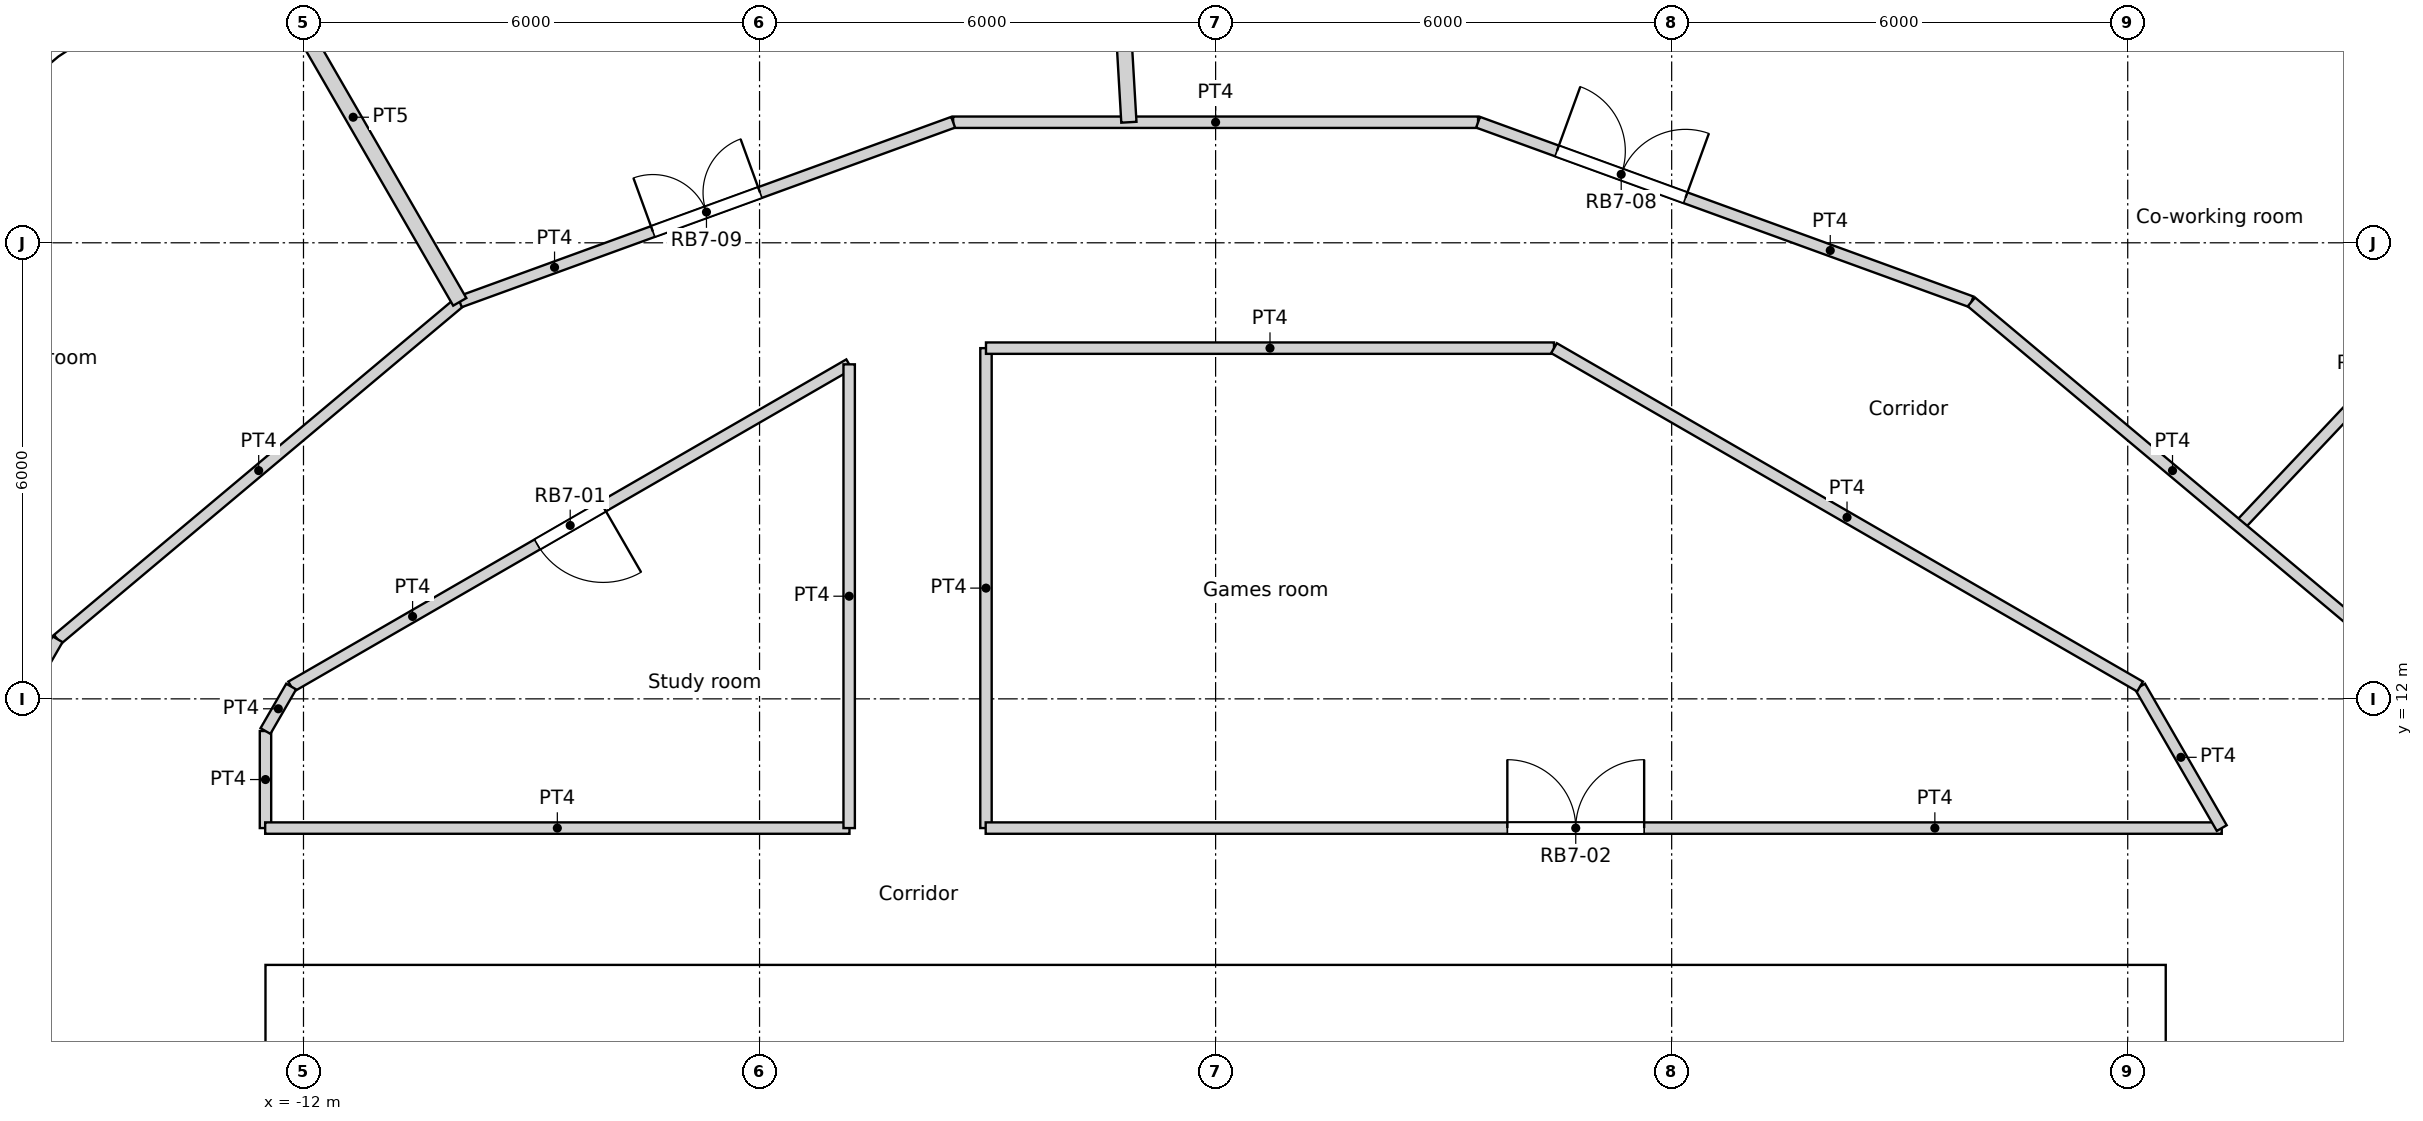
"""IFC4 building model, lengths in metres.
Left out: names, types, materials, properties, quantities, classifications, styles, units other than length and angle.
Written with IfcOpenShell. Run it as: python <this file> out.ifc"""

import sys

from ifc_helpers import new_model, si_unit, direction, frame, frame_2d, origin, origin_2d, place, context, subcontext, project, spatial, rectangle, circle, extrude, element, fill, save


model = new_model("IFC4")
c1 = context("Model", 3, precision=1e-05, world=origin(), true_north=direction((0.0, 1.0)))
c2 = subcontext(c1, "Body", "Model", "MODEL_VIEW")
j1 = project(units=[si_unit("LENGTHUNIT", "METRE"), si_unit("PLANEANGLEUNIT", "RADIAN")], contexts=[c1])
p1 = place(None, origin())
s1 = spatial("IfcSite", under=j1, at=p1, CompositionType="ELEMENT")
p2 = place(p1, origin())
s2 = spatial("IfcBuilding", under=s1, at=p2, CompositionType="ELEMENT")
p3 = place(p2, frame((0.0, 0.0, 190.8)))
s3 = spatial("IfcBuildingStorey", under=s2, at=p3, CompositionType="ELEMENT", Elevation=190.8)
p4 = place(p3, frame((14.659, 19.69, 0.0), z_axis=(0.0, 0.0, 1.0), x_axis=(1.0, 0.0, 0.0)))
e1 = element("IfcColumn", 1, at=p4, inside=s3, PredefinedType="COLUMN", context=c2, shape_type="SweptSolid", body=[
    extrude(circle(Radius=0.6, at=origin_2d()), origin(), (0.0, 0.0, 1.0), 3.6),
])
for number, where, z_axis, x_axis in (
    (2, (11.735, 14.716, 0.0), (0.0, 0.0, 1.0), (1.0, 0.0, 0.0)),
    (3, (6.876, 17.521, 0.0), (0.0, 0.0, 1.0), (1.0, 0.0, 0.0)),
    (4, (1.406, 18.77, 0.0), (0.0, 0.0, 1.0), (1.0, 0.0, 0.0)),
    (5, (-4.188, 18.35, 0.0), (0.0, 0.0, 1.0), (1.0, 0.0, 0.0)),
    (6, (-9.411, 16.301, 0.0), (0.0, 0.0, 1.0), (1.0, 0.0, 0.0)),
    (7, (-13.798, 12.802, 0.0), (0.0, 0.0, 1.0), (1.0, 0.0, 0.0)),
):
    element("IfcColumn", number, at=place(p3, frame(where, z_axis=z_axis, x_axis=x_axis)), inside=s3, PredefinedType="COLUMN", context=c2, shape_type="SweptSolid", body=[
        extrude(circle(Radius=0.65, at=origin_2d()), origin(), (0.0, 0.0, 1.0), 3.6),
    ])
p5 = place(p3, frame((15.639, 21.048, -0.3), z_axis=(0.0, 0.0, 1.0), x_axis=(-0.835514416706, 0.549468524554, 0.0)))
e8 = element("IfcWall", 8, at=p5, inside=s3, PredefinedType="ELEMENTEDWALL", context=c2, shape_type="SweptSolid", body=[
    extrude(rectangle(XDim=3.0, YDim=1.45, at=frame_2d((1.5, 0.0))), origin(), (0.0, 0.0, 1.0), 3.6),
])
p6 = place(p5, frame((1.5, 0.0, 1.85)))
e9 = element("IfcOpeningElement", 9, at=p6, cuts=e8, PredefinedType="OPENING", context=c2, shape_type="SweptSolid", body=[
    extrude(circle(Radius=0.9, at=origin_2d()), frame((0.0, 0.735, 0.0), z_axis=(0.0, -1.0, 0.0), x_axis=(1.0, 0.0, 0.0)), (0.0, 0.0, 1.0), 1.47),
])
p7 = place(p3, frame((-12.832, 22.206, 0.0), z_axis=(0.0, 0.0, 1.0), x_axis=(-0.835508361394, -0.54947773207, 0.0)))
e10 = element("IfcWall", 10, at=p7, inside=s3, PredefinedType="SOLIDWALL", context=c2, shape_type="SweptSolid", body=[
    extrude(rectangle(XDim=2.973, YDim=0.3, at=frame_2d((1.486, 0.0))), origin(), (0.0, 0.0, 1.0), 2.8),
])
p8 = place(p7, frame((1.486, 0.0, 1.55)))
e11 = element("IfcOpeningElement", 11, at=p8, cuts=e10, PredefinedType="OPENING", context=c2, shape_type="SweptSolid", body=[
    extrude(circle(Radius=0.9, at=origin_2d()), frame((0.0, 0.16, 0.0), z_axis=(0.0, -1.0, 0.0), x_axis=(1.0, 0.0, 0.0)), (0.0, 0.0, 1.0), 0.32),
])
p9 = place(p3, frame((-15.316, 20.573, 0.0), z_axis=(0.0, 0.0, 1.0), x_axis=(-0.766008913364, -0.642829950023, 0.0)))
e12 = element("IfcWall", 12, at=p9, inside=s3, PredefinedType="SOLIDWALL", context=c2, shape_type="SweptSolid", body=[
    extrude(rectangle(XDim=2.973, YDim=0.3, at=frame_2d((1.486, 0.0))), origin(), (0.0, 0.0, 1.0), 3.3),
])
p10 = place(p9, frame((1.486, 0.0, 1.55)))
e13 = element("IfcOpeningElement", 13, at=p10, cuts=e12, PredefinedType="OPENING", context=c2, shape_type="SweptSolid", body=[
    extrude(circle(Radius=0.9, at=origin_2d()), frame((0.0, 0.16, 0.0), z_axis=(0.0, -1.0, 0.0), x_axis=(1.0, 0.0, 0.0)), (0.0, 0.0, 1.0), 0.32),
])
p11 = place(p3, frame((-12.5, 8.05, 0.0), z_axis=(0.0, 0.0, 1.0), x_axis=(1.0, 0.0, 0.0)))
e14 = element("IfcWall", 14, at=p11, inside=s3, PredefinedType="SOLIDWALL", context=c2, shape_type="SweptSolid", body=[
    extrude(rectangle(XDim=25.0, YDim=0.9, at=frame_2d((12.5, 0.0))), origin(), (0.0, 0.0, 1.0), 3.6),
])
p12 = place(p11, frame((8.3, 0.0, 0.0)))
e15 = element("IfcOpeningElement", 15, at=p12, cuts=e14, PredefinedType="OPENING", context=c2, shape_type="SweptSolid", body=[
    extrude(rectangle(XDim=1.8, YDim=2.1, at=frame_2d((0.9, 1.05))), frame((0.0, 0.45, 0.0), z_axis=(0.0, -1.0, 0.0), x_axis=(1.0, 0.0, 0.0)), (0.0, 0.0, 1.0), 0.9),
])
p13 = place(p3, frame((-12.05, -7.6, 0.0), z_axis=(0.0, 0.0, 1.0), x_axis=(0.0, 1.0, 0.0)))
e16 = element("IfcWall", 16, at=p13, inside=s3, PredefinedType="SOLIDWALL", context=c2, shape_type="SweptSolid", body=[
    extrude(rectangle(XDim=15.2, YDim=0.9, at=frame_2d((7.6, 0.0))), origin(), (0.0, 0.0, 1.0), 3.6),
])
p14 = place(p13, frame((7.1, 0.0, 0.0)))
e17 = element("IfcOpeningElement", 17, at=p14, cuts=e16, PredefinedType="OPENING", context=c2, shape_type="SweptSolid", body=[
    extrude(rectangle(XDim=1.0, YDim=2.1, at=frame_2d((0.5, 1.05))), frame((0.0, 0.45, 0.0), z_axis=(0.0, -1.0, 0.0), x_axis=(1.0, 0.0, 0.0)), (0.0, 0.0, 1.0), 0.9),
])
p15 = place(p3, frame((12.05, -7.6, 0.0), z_axis=(0.0, 0.0, 1.0), x_axis=(0.0, 1.0, 0.0)))
e18 = element("IfcWall", 18, at=p15, inside=s3, PredefinedType="SOLIDWALL", context=c2, shape_type="SweptSolid", body=[
    extrude(rectangle(XDim=15.2, YDim=0.9, at=frame_2d((7.6, 0.0))), origin(), (0.0, 0.0, 1.0), 3.6),
])
p16 = place(p15, frame((5.1, 0.0, 0.0)))
e19 = element("IfcOpeningElement", 19, at=p16, cuts=e18, PredefinedType="OPENING", context=c2, shape_type="SweptSolid", body=[
    extrude(rectangle(XDim=1.0, YDim=2.1, at=frame_2d((0.5, 1.05))), frame((0.0, 0.45, 0.0), z_axis=(0.0, -1.0, 0.0), x_axis=(1.0, 0.0, 0.0)), (0.0, 0.0, 1.0), 0.9),
])
for number, where, z_axis, x_axis in (
    (20, (-2.25, 3.25, 0.0), (0.0, 0.0, 1.0), (0.0, 1.0, 0.0)),
    (21, (0.55, 3.25, 0.0), (0.0, 0.0, 1.0), (0.0, 1.0, 0.0)),
):
    element("IfcWall", number, at=place(p3, frame(where, z_axis=z_axis, x_axis=x_axis)), inside=s3, PredefinedType="SOLIDWALL", context=c2, shape_type="SweptSolid", body=[
        extrude(rectangle(XDim=4.35, YDim=0.3, at=frame_2d((2.175, 0.0))), origin(), (0.0, 0.0, 1.0), 3.3),
    ])
p17 = place(p3, frame((-9.05, -7.0, 0.0), z_axis=(0.0, 0.0, 1.0), x_axis=(0.0, 1.0, 0.0)))
e22 = element("IfcWall", 22, at=p17, inside=s3, PredefinedType="SOLIDWALL", context=c2, shape_type="SweptSolid", body=[
    extrude(rectangle(XDim=14.6, YDim=0.3, at=frame_2d((7.3, 0.0))), origin(), (0.0, 0.0, 1.0), 3.3),
])
p18 = place(p3, frame((-4.275, 6.7, 0.0), z_axis=(0.0, 0.0, 1.0), x_axis=(0.0, 1.0, 0.0)))
e23 = element("IfcWall", 23, at=p18, inside=s3, PredefinedType="SOLIDWALL", context=c2, shape_type="SweptSolid", body=[
    extrude(rectangle(XDim=0.9, YDim=0.15, at=frame_2d((0.45, 0.0))), origin(), (0.0, 0.0, 1.0), 3.3),
])
p19 = place(p3, frame((0.7, 7.15, 0.0), z_axis=(0.0, 0.0, 1.0), x_axis=(1.0, 0.0, 0.0)))
e24 = element("IfcWall", 24, at=p19, inside=s3, PredefinedType="SOLIDWALL", context=c2, shape_type="SweptSolid", body=[
    extrude(rectangle(XDim=8.35, YDim=0.9, at=frame_2d((4.175, 0.0))), origin(), (0.0, 0.0, 1.0), 3.3),
])
p20 = place(p3, frame((-12.504, 10.3, 0.0), z_axis=(0.0, 0.0, 1.0), x_axis=(1.0, 0.0, 0.0)))
e25 = element("IfcWall", 25, at=p20, inside=s3, PredefinedType="PARTITIONING", context=c2, shape_type="SweptSolid", body=[
    extrude(rectangle(XDim=7.687, YDim=0.15, at=frame_2d((3.844, 0.0))), origin(), (0.0, 0.0, 1.0), 3.3),
])
p21 = place(p3, frame((-3.025, 10.3, 0.0), z_axis=(0.0, 0.0, 1.0), x_axis=(1.0, 0.0, 0.0)))
e26 = element("IfcWall", 26, at=p21, inside=s3, PredefinedType="PARTITIONING", context=c2, shape_type="SweptSolid", body=[
    extrude(rectangle(XDim=16.262, YDim=0.15, at=frame_2d((8.131, 0.0))), origin(), (0.0, 0.0, 1.0), 3.3),
])
p22 = place(p21, frame((6.863, 0.0, 0.0)))
e27 = element("IfcOpeningElement", 27, at=p22, cuts=e26, PredefinedType="OPENING", context=c2, shape_type="SweptSolid", body=[
    extrude(rectangle(XDim=1.8, YDim=2.1, at=frame_2d((0.9, 1.05))), frame((0.0, 0.075, 0.0), z_axis=(0.0, -1.0, 0.0), x_axis=(1.0, 0.0, 0.0)), (0.0, 0.0, 1.0), 0.15),
])
p23 = place(p3, frame((12.162, 12.162, 0.0), z_axis=(0.0, 0.0, 1.0), x_axis=(0.499961633463, -0.866047553582, 0.0)))
e28 = element("IfcWall", 28, at=p23, inside=s3, PredefinedType="PARTITIONING", context=c2, shape_type="SweptSolid", body=[
    extrude(rectangle(XDim=2.15, YDim=0.15, at=frame_2d((1.075, 0.0))), origin(), (0.0, 0.0, 1.0), 3.3),
])
p24 = place(p3, frame((9.943, 17.222, 0.0), z_axis=(0.0, 0.0, 1.0), x_axis=(0.766192104565, -0.642611592567, 0.0)))
e29 = element("IfcWall", 29, at=p24, inside=s3, PredefinedType="PARTITIONING", context=c2, shape_type="SweptSolid", body=[
    extrude(rectangle(XDim=6.906, YDim=0.15, at=frame_2d((3.453, 0.0))), origin(), (0.0, 0.0, 1.0), 3.3),
])
p25 = place(p3, frame((-4.821, 10.3, 0.0), z_axis=(0.0, 0.0, 1.0), x_axis=(0.0, 1.0, 0.0)))
e30 = element("IfcWall", 30, at=p25, inside=s3, PredefinedType="PARTITIONING", context=c2, shape_type="SweptSolid", body=[
    extrude(rectangle(XDim=6.101, YDim=0.15, at=frame_2d((3.05, 0.0))), origin(), (0.0, 0.0, 1.0), 3.3),
])
p26 = place(p3, frame((-12.162, 12.162, 0.0), z_axis=(0.0, 0.0, 1.0), x_axis=(0.866004766557, 0.500035743023, 0.0)))
e31 = element("IfcWall", 31, at=p26, inside=s3, PredefinedType="PARTITIONING", context=c2, shape_type="SweptSolid", body=[
    extrude(rectangle(XDim=8.477, YDim=0.15, at=frame_2d((4.239, 0.0))), origin(), (0.0, 0.0, 1.0), 3.3),
])
p27 = place(p26, frame((3.739, 0.0, 0.0)))
e32 = element("IfcOpeningElement", 32, at=p27, cuts=e31, PredefinedType="OPENING", context=c2, shape_type="SweptSolid", body=[
    extrude(rectangle(XDim=1.0, YDim=2.04, at=frame_2d((0.5, 1.02))), frame((0.0, 0.075, 0.0), z_axis=(0.0, -1.0, 0.0), x_axis=(1.0, 0.0, 0.0)), (0.0, 0.0, 1.0), 0.15),
])
p28 = place(p3, frame((4.452, 16.614, 0.0), z_axis=(0.0, 0.0, 1.0), x_axis=(0.866005203721, -0.500034985904, 0.0)))
e33 = element("IfcWall", 33, at=p28, inside=s3, PredefinedType="PARTITIONING", context=c2, shape_type="SweptSolid", body=[
    extrude(rectangle(XDim=8.903, YDim=0.15, at=frame_2d((4.452, 0.0))), origin(), (0.0, 0.0, 1.0), 3.3),
])
p29 = place(p3, frame((-3.021, 16.614, 0.0), z_axis=(0.0, 0.0, 1.0), x_axis=(1.0, 0.0, 0.0)))
e34 = element("IfcWall", 34, at=p29, inside=s3, PredefinedType="PARTITIONING", context=c2, shape_type="SweptSolid", body=[
    extrude(rectangle(XDim=7.473, YDim=0.15, at=frame_2d((3.736, 0.0))), origin(), (0.0, 0.0, 1.0), 3.3),
])
p30 = place(p3, frame((-3.021, 10.3, 0.0), z_axis=(0.0, 0.0, 1.0), x_axis=(0.0, 1.0, 0.0)))
e35 = element("IfcWall", 35, at=p30, inside=s3, PredefinedType="PARTITIONING", context=c2, shape_type="SweptSolid", body=[
    extrude(rectangle(XDim=6.314, YDim=0.15, at=frame_2d((3.157, 0.0))), origin(), (0.0, 0.0, 1.0), 3.3),
])
p31 = place(p3, frame((-3.453, 19.586, 0.0), z_axis=(0.0, 0.0, 1.0), x_axis=(1.0, 0.0, 0.0)))
e36 = element("IfcWall", 36, at=p31, inside=s3, PredefinedType="PARTITIONING", context=c2, shape_type="SweptSolid", body=[
    extrude(rectangle(XDim=6.906, YDim=0.15, at=frame_2d((3.453, 0.0))), origin(), (0.0, 0.0, 1.0), 3.3),
])
p32 = place(p3, frame((3.453, 19.586, 0.0), z_axis=(0.0, 0.0, 1.0), x_axis=(0.939672634566, -0.342075050021, 0.0)))
e37 = element("IfcWall", 37, at=p32, inside=s3, PredefinedType="PARTITIONING", context=c2, shape_type="SweptSolid", body=[
    extrude(rectangle(XDim=6.908, YDim=0.15, at=frame_2d((3.454, 0.0))), origin(), (0.0, 0.0, 1.0), 3.3),
])
p33 = place(p32, frame((1.104, 0.0, 0.0)))
e38 = element("IfcOpeningElement", 38, at=p33, cuts=e37, PredefinedType="OPENING", context=c2, shape_type="SweptSolid", body=[
    extrude(rectangle(XDim=1.8, YDim=2.1, at=frame_2d((0.9, 1.05))), frame((0.0, 0.075, 0.0), z_axis=(0.0, -1.0, 0.0), x_axis=(1.0, 0.0, 0.0)), (0.0, 0.0, 1.0), 0.15),
])
p34 = place(p3, frame((-9.944, 17.223, 0.0), z_axis=(0.0, 0.0, 1.0), x_axis=(0.939672634566, 0.342075050021, 0.0)))
e39 = element("IfcWall", 39, at=p34, inside=s3, PredefinedType="PARTITIONING", context=c2, shape_type="SweptSolid", body=[
    extrude(rectangle(XDim=6.908, YDim=0.15, at=frame_2d((3.454, 0.0))), origin(), (0.0, 0.0, 1.0), 3.3),
])
p35 = place(p34, frame((2.704, 0.0, 0.0)))
e40 = element("IfcOpeningElement", 40, at=p35, cuts=e39, PredefinedType="OPENING", context=c2, shape_type="SweptSolid", body=[
    extrude(rectangle(XDim=1.5, YDim=2.1, at=frame_2d((0.75, 1.05))), frame((0.0, 0.075, 0.0), z_axis=(0.0, -1.0, 0.0), x_axis=(1.0, 0.0, 0.0)), (0.0, 0.0, 1.0), 0.15),
])
p36 = place(p3, frame((-15.235, 12.784, 0.0), z_axis=(0.0, 0.0, 1.0), x_axis=(0.766064078986, 0.642764207845, 0.0)))
e41 = element("IfcWall", 41, at=p36, inside=s3, PredefinedType="PARTITIONING", context=c2, shape_type="SweptSolid", body=[
    extrude(rectangle(XDim=6.906, YDim=0.15, at=frame_2d((3.453, 0.0))), origin(), (0.0, 0.0, 1.0), 3.3),
])
p37 = place(p3, frame((-12.5, 11.577, 0.0), z_axis=(0.0, 0.0, 1.0), x_axis=(0.500024767483, 0.866011103799, 0.0)))
e42 = element("IfcWall", 42, at=p37, inside=s3, PredefinedType="PARTITIONING", context=c2, shape_type="SweptSolid", body=[
    extrude(rectangle(XDim=0.676, YDim=0.15, at=frame_2d((0.338, 0.0))), origin(), (0.0, 0.0, 1.0), 3.3),
])
p38 = place(p3, frame((-12.5, 10.3, 0.0), z_axis=(0.0, 0.0, 1.0), x_axis=(0.0, 1.0, 0.0)))
e43 = element("IfcWall", 43, at=p38, inside=s3, PredefinedType="PARTITIONING", context=c2, shape_type="SweptSolid", body=[
    extrude(rectangle(XDim=1.277, YDim=0.15, at=frame_2d((0.638, 0.0))), origin(), (0.0, 0.0, 1.0), 3.3),
])
p39 = place(p3, frame((-18.688, 6.802, 0.0), z_axis=(0.0, 0.0, 1.0), x_axis=(0.499914202267, 0.866074933462, 0.0)))
e44 = element("IfcWall", 44, at=p39, inside=s3, PredefinedType="PARTITIONING", context=c2, shape_type="SweptSolid", body=[
    extrude(rectangle(XDim=6.907, YDim=0.15, at=frame_2d((3.454, 0.0))), origin(), (0.0, 0.0, 1.0), 3.3),
])
p40 = place(p39, frame((3.004, 0.0, 0.0)))
e45 = element("IfcOpeningElement", 45, at=p40, cuts=e44, PredefinedType="OPENING", context=c2, shape_type="SweptSolid", body=[
    extrude(rectangle(XDim=1.0, YDim=2.04, at=frame_2d((0.5, 1.02))), frame((0.0, 0.075, 0.0), z_axis=(0.0, -1.0, 0.0), x_axis=(1.0, 0.0, 0.0)), (0.0, 0.0, 1.0), 0.15),
])
p41 = place(p3, frame((13.463, 14.27, 0.0), z_axis=(0.0, 0.0, 1.0), x_axis=(0.6862502776, 0.72736549031, 0.0)))
e46 = element("IfcWall", 46, at=p41, inside=s3, PredefinedType="PARTITIONING", context=c2, shape_type="SweptSolid", body=[
    extrude(rectangle(XDim=5.879, YDim=0.15, at=frame_2d((2.939, 0.0))), origin(), (0.0, 0.0, 1.0), 3.3),
])
p42 = place(p3, frame((-1.483, 25.454, 0.0), z_axis=(0.0, 0.0, 1.0), x_axis=(0.058147412668, -0.998308007781, 0.0)))
e47 = element("IfcWall", 47, at=p42, inside=s3, PredefinedType="PARTITIONING", context=c2, shape_type="SweptSolid", body=[
    extrude(rectangle(XDim=5.878, YDim=0.2, at=frame_2d((2.939, 0.0))), origin(), (0.0, 0.0, 1.0), 3.3),
])
p43 = place(p3, frame((-12.749, 22.081, 0.0), z_axis=(0.0, 0.0, 1.0), x_axis=(0.500010020406, -0.866019618423, 0.0)))
e48 = element("IfcWall", 48, at=p43, inside=s3, PredefinedType="PARTITIONING", context=c2, shape_type="SweptSolid", body=[
    extrude(rectangle(XDim=5.61, YDim=0.2, at=frame_2d((2.805, 0.0))), origin(), (0.0, 0.0, 1.0), 3.3),
])
p44 = place(p12, origin())
e49 = element("IfcDoor", 49, at=p44, inside=s3, OperationType="DOUBLE_DOOR_SINGLE_SWING", PredefinedType="DOOR", context=c2, shape_type="SweptSolid", body=[
    extrude(rectangle(XDim=1.8, YDim=2.1, at=frame_2d((0.9, 1.05))), frame((0.0, 0.025, 0.0), z_axis=(0.0, -1.0, 0.0), x_axis=(1.0, 0.0, 0.0)), (0.0, 0.0, 1.0), 0.05),
])
fill(e15, e49)
p45 = place(p27, origin())
e50 = element("IfcDoor", 50, at=p45, inside=s3, OperationType="SINGLE_SWING_LEFT", PredefinedType="DOOR", context=c2, shape_type="SweptSolid", body=[
    extrude(rectangle(XDim=1.0, YDim=2.04, at=frame_2d((0.5, 1.02))), frame((0.0, 0.025, 0.0), z_axis=(0.0, -1.0, 0.0), x_axis=(1.0, 0.0, 0.0)), (0.0, 0.0, 1.0), 0.05),
])
fill(e32, e50)
p46 = place(p22, origin())
e51 = element("IfcDoor", 51, at=p46, inside=s3, OperationType="DOUBLE_DOOR_SINGLE_SWING", PredefinedType="DOOR", context=c2, shape_type="SweptSolid", body=[
    extrude(rectangle(XDim=1.8, YDim=2.1, at=frame_2d((0.9, 1.05))), frame((0.0, 0.025, 0.0), z_axis=(0.0, -1.0, 0.0), x_axis=(1.0, 0.0, 0.0)), (0.0, 0.0, 1.0), 0.05),
])
fill(e27, e51)
p47 = place(p33, origin())
e52 = element("IfcDoor", 52, at=p47, inside=s3, OperationType="DOUBLE_DOOR_SINGLE_SWING", PredefinedType="DOOR", context=c2, shape_type="SweptSolid", body=[
    extrude(rectangle(XDim=1.8, YDim=2.1, at=frame_2d((0.9, 1.05))), frame((0.0, 0.025, 0.0), z_axis=(0.0, -1.0, 0.0), x_axis=(1.0, 0.0, 0.0)), (0.0, 0.0, 1.0), 0.05),
])
fill(e38, e52)
p48 = place(p35, origin())
e53 = element("IfcDoor", 53, at=p48, inside=s3, OperationType="DOUBLE_DOOR_SINGLE_SWING", PredefinedType="DOOR", context=c2, shape_type="SweptSolid", body=[
    extrude(rectangle(XDim=1.5, YDim=2.1, at=frame_2d((0.75, 1.05))), frame((0.0, 0.025, 0.0), z_axis=(0.0, -1.0, 0.0), x_axis=(1.0, 0.0, 0.0)), (0.0, 0.0, 1.0), 0.05),
])
fill(e40, e53)
save(model, sys.argv[1])
